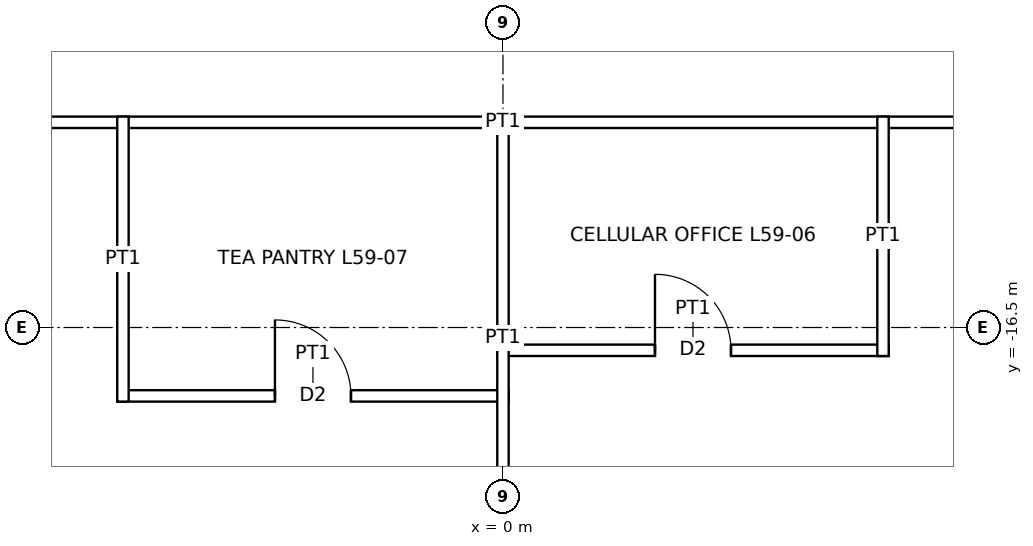
"""IFC4 building model, lengths in metres.
Left out: names, types, materials, properties, quantities, classifications, styles, units other than length and angle.
Written with IfcOpenShell. Run it as: python <this file> out.ifc"""

import sys

from ifc_helpers import new_model, si_unit, direction, frame, frame_2d, origin, place, context, subcontext, project, spatial, rectangle, extrude, element, fill, save


model = new_model("IFC4")
c1 = context("Model", 3, precision=1e-05, world=origin(), true_north=direction((0.0, 1.0)))
c2 = subcontext(c1, "Body", "Model", "MODEL_VIEW")
j1 = project(units=[si_unit("LENGTHUNIT", "METRE"), si_unit("PLANEANGLEUNIT", "RADIAN")], contexts=[c1])
p1 = place(None, origin())
s1 = spatial("IfcSite", under=j1, at=p1, CompositionType="ELEMENT")
p2 = place(p1, origin())
s2 = spatial("IfcBuilding", under=s1, at=p2, CompositionType="ELEMENT")
p3 = place(p2, frame((0.0, 0.0, 271.9)))
s3 = spatial("IfcBuildingStorey", under=s2, at=p3, CompositionType="ELEMENT", Elevation=271.9)
p4 = place(p3, frame((-5.075, -17.4, 0.0), z_axis=(0.0, 0.0, 1.0), x_axis=(1.0, 0.0, 0.0)))
e1 = element("IfcWall", 1, at=p4, inside=s3, PredefinedType="PARTITIONING", context=c2, shape_type="SweptSolid", body=[
    extrude(rectangle(XDim=5.15, YDim=0.15, at=frame_2d((2.575, 0.0))), origin(), (0.0, 0.0, 1.0), 3.85),
])
p5 = place(p4, frame((2.075, 0.0, 0.0)))
e2 = element("IfcOpeningElement", 2, at=p5, cuts=e1, PredefinedType="OPENING", context=c2, shape_type="SweptSolid", body=[
    extrude(rectangle(XDim=1.0, YDim=2.1, at=frame_2d((0.5, 1.05))), frame((0.0, 0.085, 0.0), z_axis=(0.0, -1.0, 0.0), x_axis=(1.0, 0.0, 0.0)), (0.0, 0.0, 1.0), 0.17),
])
p6 = place(p3, frame((-0.075, -16.8, 0.0), z_axis=(0.0, 0.0, 1.0), x_axis=(1.0, 0.0, 0.0)))
e3 = element("IfcWall", 3, at=p6, inside=s3, PredefinedType="PARTITIONING", context=c2, shape_type="SweptSolid", body=[
    extrude(rectangle(XDim=5.15, YDim=0.15, at=frame_2d((2.575, 0.0))), origin(), (0.0, 0.0, 1.0), 3.85),
])
p7 = place(p6, frame((2.075, 0.0, 0.0)))
e4 = element("IfcOpeningElement", 4, at=p7, cuts=e3, PredefinedType="OPENING", context=c2, shape_type="SweptSolid", body=[
    extrude(rectangle(XDim=1.0, YDim=2.1, at=frame_2d((0.5, 1.05))), frame((0.0, 0.085, 0.0), z_axis=(0.0, -1.0, 0.0), x_axis=(1.0, 0.0, 0.0)), (0.0, 0.0, 1.0), 0.17),
])
p8 = place(p3, frame((-13.875, -13.8, 0.0), z_axis=(0.0, 0.0, 1.0), x_axis=(1.0, 0.0, 0.0)))
e5 = element("IfcWall", 5, at=p8, inside=s3, PredefinedType="PARTITIONING", context=c2, shape_type="SweptSolid", body=[
    extrude(rectangle(XDim=27.75, YDim=0.15, at=frame_2d((13.875, 0.0))), origin(), (0.0, 0.0, 1.0), 3.85),
])
p9 = place(p8, frame((3.975, 0.0, 0.0)))
e6 = element("IfcOpeningElement", 6, at=p9, cuts=e5, PredefinedType="OPENING", context=c2, shape_type="SweptSolid", body=[
    extrude(rectangle(XDim=1.0, YDim=2.4, at=frame_2d((0.5, 1.2))), frame((0.0, 0.085, 0.0), z_axis=(0.0, -1.0, 0.0), x_axis=(1.0, 0.0, 0.0)), (0.0, 0.0, 1.0), 0.17),
])
p10 = place(p3, frame((-5.0, -17.475, 0.0), z_axis=(0.0, 0.0, 1.0), x_axis=(0.0, 1.0, 0.0)))
e7 = element("IfcWall", 7, at=p10, inside=s3, PredefinedType="PARTITIONING", context=c2, shape_type="SweptSolid", body=[
    extrude(rectangle(XDim=3.75, YDim=0.15, at=frame_2d((1.875, 0.0))), origin(), (0.0, 0.0, 1.0), 3.85),
])
p11 = place(p3, frame((0.0, -19.54, 0.0), z_axis=(0.0, 0.0, 1.0), x_axis=(0.0, 1.0, 0.0)))
e8 = element("IfcWall", 8, at=p11, inside=s3, PredefinedType="PARTITIONING", context=c2, shape_type="SweptSolid", body=[
    extrude(rectangle(XDim=5.815, YDim=0.15, at=frame_2d((2.907, 0.0))), origin(), (0.0, 0.0, 1.0), 3.243),
])
p12 = place(p3, frame((5.0, -16.875, 0.0), z_axis=(0.0, 0.0, 1.0), x_axis=(0.0, 1.0, 0.0)))
e9 = element("IfcWall", 9, at=p12, inside=s3, PredefinedType="PARTITIONING", context=c2, shape_type="SweptSolid", body=[
    extrude(rectangle(XDim=3.15, YDim=0.15, at=frame_2d((1.575, 0.0))), origin(), (0.0, 0.0, 1.0), 3.85),
])
p13 = place(p7, origin())
e10 = element("IfcDoor", 10, at=p13, inside=s3, OperationType="SINGLE_SWING_LEFT", PredefinedType="DOOR", context=c2, shape_type="SweptSolid", body=[
    extrude(rectangle(XDim=1.0, YDim=2.1, at=frame_2d((0.5, 1.05))), frame((0.0, 0.025, 0.0), z_axis=(0.0, -1.0, 0.0), x_axis=(1.0, 0.0, 0.0)), (0.0, 0.0, 1.0), 0.05),
])
fill(e4, e10)
p14 = place(p5, origin())
e11 = element("IfcDoor", 11, at=p14, inside=s3, OperationType="SINGLE_SWING_LEFT", PredefinedType="DOOR", context=c2, shape_type="SweptSolid", body=[
    extrude(rectangle(XDim=1.0, YDim=2.1, at=frame_2d((0.5, 1.05))), frame((0.0, 0.025, 0.0), z_axis=(0.0, -1.0, 0.0), x_axis=(1.0, 0.0, 0.0)), (0.0, 0.0, 1.0), 0.05),
])
fill(e2, e11)
save(model, sys.argv[1])
